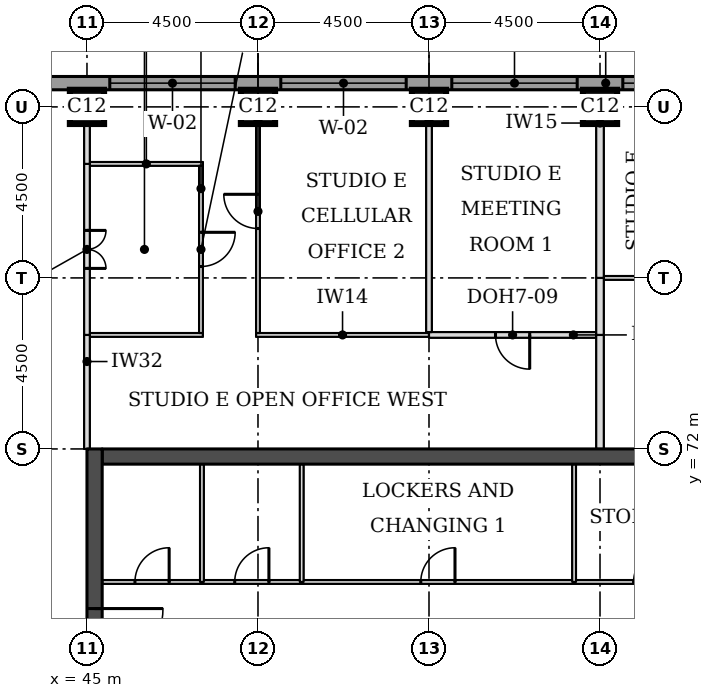
"""IFC4 building model, lengths in metres.
Left out: names, types, materials, properties, quantities, classifications, styles, units other than length and angle.
Written with IfcOpenShell. Run it as: python <this file> out.ifc"""

import sys

from ifc_helpers import new_model, si_unit, direction, frame, frame_2d, origin, origin_2d, place, context, subcontext, project, spatial, rectangle, extrude, element, fill, save


model = new_model("IFC4")
c1 = context("Model", 3, precision=1e-05, world=origin(), true_north=direction((0.0, 1.0)))
c2 = subcontext(c1, "Body", "Model", "MODEL_VIEW")
j1 = project(units=[si_unit("LENGTHUNIT", "METRE"), si_unit("PLANEANGLEUNIT", "RADIAN")], contexts=[c1])
p1 = place(None, origin())
s1 = spatial("IfcSite", under=j1, at=p1, CompositionType="ELEMENT")
p2 = place(p1, origin())
s2 = spatial("IfcBuilding", under=s1, at=p2, CompositionType="ELEMENT")
p3 = place(p2, frame((0.0, 0.0, 192.1)))
s3 = spatial("IfcBuildingStorey", under=s2, at=p3, CompositionType="ELEMENT", Elevation=192.1)
for number, where, z_axis, x_axis in (
    (1, (45.0, 81.0, 0.0), (0.0, 0.0, 1.0), (1.0, 0.0, 0.0)),
    (2, (49.5, 81.0, 0.0), (0.0, 0.0, 1.0), (1.0, 0.0, 0.0)),
    (3, (54.0, 81.0, 0.0), (0.0, 0.0, 1.0), (1.0, 0.0, 0.0)),
    (4, (58.5, 81.0, 0.0), (0.0, 0.0, 1.0), (1.0, 0.0, 0.0)),
):
    element("IfcColumn", number, at=place(p3, frame(where, z_axis=z_axis, x_axis=x_axis)), inside=s3, PredefinedType="COLUMN", context=c2, shape_type="SweptSolid", body=[
        extrude(rectangle(XDim=0.9, YDim=0.9, at=origin_2d()), origin(), (0.0, 0.0, 1.0), 3.7),
    ])
p4 = place(p3, frame((45.4, 71.8, 0.0), z_axis=(0.0, 0.0, 1.0), x_axis=(1.0, 0.0, 0.0)))
e5 = element("IfcWall", 5, at=p4, inside=s3, PredefinedType="SHEAR", context=c2, shape_type="SweptSolid", body=[
    extrude(rectangle(XDim=21.7, YDim=0.4, at=frame_2d((10.85, 0.0))), origin(), (0.0, 0.0, 1.0), 3.7),
])
p5 = place(p3, frame((45.2, 49.5, 0.0), z_axis=(0.0, 0.0, 1.0), x_axis=(0.0, 1.0, 0.0)))
e6 = element("IfcWall", 6, at=p5, inside=s3, PredefinedType="SHEAR", context=c2, shape_type="SweptSolid", body=[
    extrude(rectangle(XDim=22.5, YDim=0.4, at=frame_2d((11.25, 0.0))), origin(), (0.0, 0.0, 1.0), 3.7),
])
p6 = place(p5, frame((4.2, 0.0, 0.0)))
e7 = element("IfcOpeningElement", 7, at=p6, cuts=e6, PredefinedType="OPENING", context=c2, shape_type="SweptSolid", body=[
    extrude(rectangle(XDim=1.8, YDim=2.1, at=frame_2d((0.9, 1.05))), frame((0.0, 0.21, 0.0), z_axis=(0.0, -1.0, 0.0), x_axis=(1.0, 0.0, 0.0)), (0.0, 0.0, 1.0), 0.42),
])
p7 = place(p5, frame((6.9, 0.0, 0.0)))
e8 = element("IfcOpeningElement", 8, at=p7, cuts=e6, PredefinedType="OPENING", context=c2, shape_type="SweptSolid", body=[
    extrude(rectangle(XDim=1.1, YDim=2.1, at=frame_2d((0.55, 1.05))), frame((0.0, 0.21, 0.0), z_axis=(0.0, -1.0, 0.0), x_axis=(1.0, 0.0, 0.0)), (0.0, 0.0, 1.0), 0.42),
])
p8 = place(p5, frame((13.6, 0.0, 0.0)))
e9 = element("IfcOpeningElement", 9, at=p8, cuts=e6, PredefinedType="OPENING", context=c2, shape_type="SweptSolid", body=[
    extrude(rectangle(XDim=1.1, YDim=2.1, at=frame_2d((0.55, 1.05))), frame((0.0, 0.21, 0.0), z_axis=(0.0, -1.0, 0.0), x_axis=(1.0, 0.0, 0.0)), (0.0, 0.0, 1.0), 0.42),
])
p9 = place(p5, frame((16.5, 0.0, 0.0)))
e10 = element("IfcOpeningElement", 10, at=p9, cuts=e6, PredefinedType="OPENING", context=c2, shape_type="SweptSolid", body=[
    extrude(rectangle(XDim=1.8, YDim=2.1, at=frame_2d((0.9, 1.05))), frame((0.0, 0.21, 0.0), z_axis=(0.0, -1.0, 0.0), x_axis=(1.0, 0.0, 0.0)), (0.0, 0.0, 1.0), 0.42),
])
p10 = place(p3, frame((72.331, 81.625, 0.0), z_axis=(0.0, 0.0, 1.0), x_axis=(-1.0, 0.0, 0.0)))
e11 = element("IfcWall", 11, at=p10, inside=s3, PredefinedType="STANDARD", context=c2, shape_type="SweptSolid", body=[
    extrude(rectangle(XDim=32.163, YDim=0.35, at=frame_2d((16.081, 0.0))), origin(), (0.0, 0.0, 1.0), 3.525),
])
p11 = place(p10, frame((5.431, 0.0, 0.9)))
e12 = element("IfcOpeningElement", 12, at=p11, cuts=e11, PredefinedType="OPENING", context=c2, shape_type="SweptSolid", body=[
    extrude(rectangle(XDim=3.3, YDim=1.9, at=frame_2d((1.65, 0.95))), frame((0.0, 0.185, 0.0), z_axis=(0.0, -1.0, 0.0), x_axis=(1.0, 0.0, 0.0)), (0.0, 0.0, 1.0), 0.37),
])
p12 = place(p10, frame((9.931, 0.0, 0.9)))
e13 = element("IfcOpeningElement", 13, at=p12, cuts=e11, PredefinedType="OPENING", context=c2, shape_type="SweptSolid", body=[
    extrude(rectangle(XDim=3.3, YDim=1.9, at=frame_2d((1.65, 0.95))), frame((0.0, 0.185, 0.0), z_axis=(0.0, -1.0, 0.0), x_axis=(1.0, 0.0, 0.0)), (0.0, 0.0, 1.0), 0.37),
])
p13 = place(p10, frame((14.431, 0.0, 0.9)))
e14 = element("IfcOpeningElement", 14, at=p13, cuts=e11, PredefinedType="OPENING", context=c2, shape_type="SweptSolid", body=[
    extrude(rectangle(XDim=3.3, YDim=1.9, at=frame_2d((1.65, 0.95))), frame((0.0, 0.185, 0.0), z_axis=(0.0, -1.0, 0.0), x_axis=(1.0, 0.0, 0.0)), (0.0, 0.0, 1.0), 0.37),
])
p14 = place(p10, frame((18.931, 0.0, 0.9)))
e15 = element("IfcOpeningElement", 15, at=p14, cuts=e11, PredefinedType="OPENING", context=c2, shape_type="SweptSolid", body=[
    extrude(rectangle(XDim=3.3, YDim=1.9, at=frame_2d((1.65, 0.95))), frame((0.0, 0.185, 0.0), z_axis=(0.0, -1.0, 0.0), x_axis=(1.0, 0.0, 0.0)), (0.0, 0.0, 1.0), 0.37),
])
p15 = place(p10, frame((23.431, 0.0, 0.9)))
e16 = element("IfcOpeningElement", 16, at=p15, cuts=e11, PredefinedType="OPENING", context=c2, shape_type="SweptSolid", body=[
    extrude(rectangle(XDim=3.3, YDim=1.9, at=frame_2d((1.65, 0.95))), frame((0.0, 0.185, 0.0), z_axis=(0.0, -1.0, 0.0), x_axis=(1.0, 0.0, 0.0)), (0.0, 0.0, 1.0), 0.37),
])
p16 = place(p3, frame((45.075, 75.0, 0.0), z_axis=(0.0, 0.0, 1.0), x_axis=(1.0, 0.0, 0.0)))
e17 = element("IfcWall", 17, at=p16, inside=s3, PredefinedType="PARTITIONING", context=c2, shape_type="SweptSolid", body=[
    extrude(rectangle(XDim=2.975, YDim=0.1, at=frame_2d((1.488, 0.0))), origin(), (0.0, 0.0, 1.0), 3.55),
])
p17 = place(p3, frame((49.45, 75.0, 0.0), z_axis=(0.0, 0.0, 1.0), x_axis=(1.0, 0.0, 0.0)))
e18 = element("IfcWall", 18, at=p17, inside=s3, PredefinedType="PARTITIONING", context=c2, shape_type="SweptSolid", body=[
    extrude(rectangle(XDim=4.55, YDim=0.1, at=frame_2d((2.275, 0.0))), origin(), (0.0, 0.0, 1.0), 3.55),
])
p18 = place(p3, frame((54.0, 75.0, 0.0), z_axis=(0.0, 0.0, 1.0), x_axis=(1.0, 0.0, 0.0)))
e19 = element("IfcWall", 19, at=p18, inside=s3, PredefinedType="PARTITIONING", context=c2, shape_type="SweptSolid", body=[
    extrude(rectangle(XDim=4.4, YDim=0.15, at=frame_2d((2.2, 0.0))), origin(), (0.0, 0.0, 1.0), 3.55),
])
p19 = place(p18, frame((1.75, 0.0, 0.0)))
e20 = element("IfcOpeningElement", 20, at=p19, cuts=e19, PredefinedType="OPENING", context=c2, shape_type="SweptSolid", body=[
    extrude(rectangle(XDim=0.9, YDim=2.1, at=frame_2d((0.45, 1.05))), frame((0.0, 0.085, 0.0), z_axis=(0.0, -1.0, 0.0), x_axis=(1.0, 0.0, 0.0)), (0.0, 0.0, 1.0), 0.17),
])
p20 = place(p3, frame((58.6, 76.5, 0.0), z_axis=(0.0, 0.0, 1.0), x_axis=(1.0, 0.0, 0.0)))
e21 = element("IfcWall", 21, at=p20, inside=s3, PredefinedType="PARTITIONING", context=c2, shape_type="SweptSolid", body=[
    extrude(rectangle(XDim=4.45, YDim=0.1, at=frame_2d((2.225, 0.0))), origin(), (0.0, 0.0, 1.0), 3.55),
])
p21 = place(p3, frame((45.075, 79.5, 0.0), z_axis=(0.0, 0.0, 1.0), x_axis=(1.0, 0.0, 0.0)))
e22 = element("IfcWall", 22, at=p21, inside=s3, PredefinedType="PARTITIONING", context=c2, shape_type="SweptSolid", body=[
    extrude(rectangle(XDim=2.975, YDim=0.1, at=frame_2d((1.488, 0.0))), origin(), (0.0, 0.0, 1.0), 3.55),
])
p22 = place(p3, frame((45.0, 72.0, 0.0), z_axis=(0.0, 0.0, 1.0), x_axis=(0.0, 1.0, 0.0)))
e23 = element("IfcWall", 23, at=p22, inside=s3, PredefinedType="PARTITIONING", context=c2, shape_type="SweptSolid", body=[
    extrude(rectangle(XDim=3.0, YDim=0.15, at=frame_2d((1.5, 0.0))), origin(), (0.0, 0.0, 1.0), 3.022),
])
p23 = place(p3, frame((58.5, 72.0, 0.0), z_axis=(0.0, 0.0, 1.0), x_axis=(0.0, 1.0, 0.0)))
e24 = element("IfcWall", 24, at=p23, inside=s3, PredefinedType="PARTITIONING", context=c2, shape_type="SweptSolid", body=[
    extrude(rectangle(XDim=3.0, YDim=0.2, at=frame_2d((1.5, 0.0))), origin(), (0.0, 0.0, 1.0), 3.55),
])
p24 = place(p3, frame((45.0, 75.0, 0.0), z_axis=(0.0, 0.0, 1.0), x_axis=(0.0, 1.0, 0.0)))
e25 = element("IfcWall", 25, at=p24, inside=s3, PredefinedType="PARTITIONING", context=c2, shape_type="SweptSolid", body=[
    extrude(rectangle(XDim=4.5, YDim=0.15, at=frame_2d((2.25, 0.0))), origin(), (0.0, 0.0, 1.0), 3.022),
])
p25 = place(p24, frame((1.75, 0.0, 0.0)))
e26 = element("IfcOpeningElement", 26, at=p25, cuts=e25, PredefinedType="OPENING", context=c2, shape_type="SweptSolid", body=[
    extrude(rectangle(XDim=1.0, YDim=2.1, at=frame_2d((0.5, 1.05))), frame((0.0, 0.085, 0.0), z_axis=(0.0, -1.0, 0.0), x_axis=(1.0, 0.0, 0.0)), (0.0, 0.0, 1.0), 0.17),
])
p26 = place(p3, frame((58.5, 75.0, 0.0), z_axis=(0.0, 0.0, 1.0), x_axis=(0.0, 1.0, 0.0)))
e27 = element("IfcWall", 27, at=p26, inside=s3, PredefinedType="PARTITIONING", context=c2, shape_type="SweptSolid", body=[
    extrude(rectangle(XDim=1.5, YDim=0.2, at=frame_2d((0.75, 0.0))), origin(), (0.0, 0.0, 1.0), 3.55),
])
p27 = place(p3, frame((48.0, 75.05, 0.0), z_axis=(0.0, 0.0, 1.0), x_axis=(0.0, 1.0, 0.0)))
e28 = element("IfcWall", 28, at=p27, inside=s3, PredefinedType="PARTITIONING", context=c2, shape_type="SweptSolid", body=[
    extrude(rectangle(XDim=4.4, YDim=0.1, at=frame_2d((2.2, 0.0))), origin(), (0.0, 0.0, 1.0), 3.55),
])
p28 = place(p27, frame((1.75, 0.0, 0.0)))
e29 = element("IfcOpeningElement", 29, at=p28, cuts=e28, PredefinedType="OPENING", context=c2, shape_type="SweptSolid", body=[
    extrude(rectangle(XDim=0.9, YDim=2.1, at=frame_2d((0.45, 1.05))), frame((0.0, 0.06, 0.0), z_axis=(0.0, -1.0, 0.0), x_axis=(1.0, 0.0, 0.0)), (0.0, 0.0, 1.0), 0.12),
])
p29 = place(p3, frame((49.5, 75.05, 0.0), z_axis=(0.0, 0.0, 1.0), x_axis=(0.0, 1.0, 0.0)))
e30 = element("IfcWall", 30, at=p29, inside=s3, PredefinedType="PARTITIONING", context=c2, shape_type="SweptSolid", body=[
    extrude(rectangle(XDim=6.4, YDim=0.1, at=frame_2d((3.2, 0.0))), origin(), (0.0, 0.0, 1.0), 3.55),
])
p30 = place(p29, frame((2.75, 0.0, 0.0)))
e31 = element("IfcOpeningElement", 31, at=p30, cuts=e30, PredefinedType="OPENING", context=c2, shape_type="SweptSolid", body=[
    extrude(rectangle(XDim=0.9, YDim=2.1, at=frame_2d((0.45, 1.05))), frame((0.0, 0.06, 0.0), z_axis=(0.0, -1.0, 0.0), x_axis=(1.0, 0.0, 0.0)), (0.0, 0.0, 1.0), 0.12),
])
p31 = place(p3, frame((54.0, 75.075, 0.0), z_axis=(0.0, 0.0, 1.0), x_axis=(0.0, 1.0, 0.0)))
e32 = element("IfcWall", 32, at=p31, inside=s3, PredefinedType="PARTITIONING", context=c2, shape_type="SweptSolid", body=[
    extrude(rectangle(XDim=6.375, YDim=0.15, at=frame_2d((3.188, 0.0))), origin(), (0.0, 0.0, 1.0), 3.55),
])
p32 = place(p3, frame((58.5, 76.5, 0.0), z_axis=(0.0, 0.0, 1.0), x_axis=(0.0, 1.0, 0.0)))
e33 = element("IfcWall", 33, at=p32, inside=s3, PredefinedType="PARTITIONING", context=c2, shape_type="SweptSolid", body=[
    extrude(rectangle(XDim=4.95, YDim=0.2, at=frame_2d((2.475, 0.0))), origin(), (0.0, 0.0, 1.0), 3.55),
])
p33 = place(p3, frame((45.0, 79.5, 0.0), z_axis=(0.0, 0.0, 1.0), x_axis=(0.0, 1.0, 0.0)))
e34 = element("IfcWall", 34, at=p33, inside=s3, PredefinedType="PARTITIONING", context=c2, shape_type="SweptSolid", body=[
    extrude(rectangle(XDim=1.95, YDim=0.15, at=frame_2d((0.975, 0.0))), origin(), (0.0, 0.0, 1.0), 3.022),
])
p34 = place(p3, frame((45.4, 68.5, 0.0), z_axis=(0.0, 0.0, 1.0), x_axis=(1.0, 0.0, 0.0)))
e35 = element("IfcWall", 35, at=p34, inside=s3, PredefinedType="PARTITIONING", context=c2, shape_type="SweptSolid", body=[
    extrude(rectangle(XDim=21.7, YDim=0.1, at=frame_2d((10.85, 0.0))), origin(), (0.0, 0.0, 1.0), 3.55),
])
p35 = place(p34, frame((18.625, 0.0, 0.0)))
e36 = element("IfcOpeningElement", 36, at=p35, cuts=e35, PredefinedType="OPENING", context=c2, shape_type="SweptSolid", body=[
    extrude(rectangle(XDim=0.9, YDim=2.1, at=frame_2d((0.45, 1.05))), frame((0.0, 0.06, 0.0), z_axis=(0.0, -1.0, 0.0), x_axis=(1.0, 0.0, 0.0)), (0.0, 0.0, 1.0), 0.12),
])
p36 = place(p34, frame((0.863, 0.0, 0.0)))
e37 = element("IfcOpeningElement", 37, at=p36, cuts=e35, PredefinedType="OPENING", context=c2, shape_type="SweptSolid", body=[
    extrude(rectangle(XDim=0.9, YDim=2.1, at=frame_2d((0.45, 1.05))), frame((0.0, 0.06, 0.0), z_axis=(0.0, -1.0, 0.0), x_axis=(1.0, 0.0, 0.0)), (0.0, 0.0, 1.0), 0.12),
])
p37 = place(p34, frame((3.488, 0.0, 0.0)))
e38 = element("IfcOpeningElement", 38, at=p37, cuts=e35, PredefinedType="OPENING", context=c2, shape_type="SweptSolid", body=[
    extrude(rectangle(XDim=0.9, YDim=2.1, at=frame_2d((0.45, 1.05))), frame((0.0, 0.06, 0.0), z_axis=(0.0, -1.0, 0.0), x_axis=(1.0, 0.0, 0.0)), (0.0, 0.0, 1.0), 0.12),
])
p38 = place(p34, frame((13.984, 0.0, 0.0)))
e39 = element("IfcOpeningElement", 39, at=p38, cuts=e35, PredefinedType="OPENING", context=c2, shape_type="SweptSolid", body=[
    extrude(rectangle(XDim=0.9, YDim=2.1, at=frame_2d((0.45, 1.05))), frame((0.0, 0.06, 0.0), z_axis=(0.0, -1.0, 0.0), x_axis=(1.0, 0.0, 0.0)), (0.0, 0.0, 1.0), 0.12),
])
p39 = place(p34, frame((8.384, 0.0, 0.0)))
e40 = element("IfcOpeningElement", 40, at=p39, cuts=e35, PredefinedType="OPENING", context=c2, shape_type="SweptSolid", body=[
    extrude(rectangle(XDim=0.9, YDim=2.1, at=frame_2d((0.45, 1.05))), frame((0.0, 0.06, 0.0), z_axis=(0.0, -1.0, 0.0), x_axis=(1.0, 0.0, 0.0)), (0.0, 0.0, 1.0), 0.12),
])
for number, where, z_axis, x_axis in (
    (41, (48.025, 68.5, 0.0), (0.0, 0.0, 1.0), (0.0, 1.0, 0.0)),
    (42, (50.65, 68.5, 0.0), (0.0, 0.0, 1.0), (0.0, 1.0, 0.0)),
    (43, (57.818, 68.5, 0.0), (0.0, 0.0, 1.0), (0.0, 1.0, 0.0)),
):
    element("IfcWall", number, at=place(p3, frame(where, z_axis=z_axis, x_axis=x_axis)), inside=s3, PredefinedType="PARTITIONING", context=c2, shape_type="SweptSolid", body=[
        extrude(rectangle(XDim=3.1, YDim=0.1, at=frame_2d((1.55, 0.0))), origin(), (0.0, 0.0, 1.0), 3.55),
    ])
p40 = place(p12, origin())
e44 = element("IfcWindow", 44, at=p40, inside=s3, PartitioningType="SINGLE_PANEL", PredefinedType="WINDOW", context=c2, shape_type="SweptSolid", body=[
    extrude(rectangle(XDim=3.3, YDim=1.9, at=frame_2d((1.65, 0.95))), frame((0.0, 0.085, 0.0), z_axis=(0.0, -1.0, 0.0), x_axis=(1.0, 0.0, 0.0)), (0.0, 0.0, 1.0), 0.06),
])
fill(e13, e44)
p41 = place(p13, origin())
e45 = element("IfcWindow", 45, at=p41, inside=s3, PartitioningType="SINGLE_PANEL", PredefinedType="WINDOW", context=c2, shape_type="SweptSolid", body=[
    extrude(rectangle(XDim=3.3, YDim=1.9, at=frame_2d((1.65, 0.95))), frame((0.0, 0.085, 0.0), z_axis=(0.0, -1.0, 0.0), x_axis=(1.0, 0.0, 0.0)), (0.0, 0.0, 1.0), 0.06),
])
fill(e14, e45)
p42 = place(p14, origin())
e46 = element("IfcWindow", 46, at=p42, inside=s3, PartitioningType="SINGLE_PANEL", PredefinedType="WINDOW", context=c2, shape_type="SweptSolid", body=[
    extrude(rectangle(XDim=3.3, YDim=1.9, at=frame_2d((1.65, 0.95))), frame((0.0, 0.085, 0.0), z_axis=(0.0, -1.0, 0.0), x_axis=(1.0, 0.0, 0.0)), (0.0, 0.0, 1.0), 0.06),
])
fill(e15, e46)
p43 = place(p15, origin())
e47 = element("IfcWindow", 47, at=p43, inside=s3, PartitioningType="SINGLE_PANEL", PredefinedType="WINDOW", context=c2, shape_type="SweptSolid", body=[
    extrude(rectangle(XDim=3.3, YDim=1.9, at=frame_2d((1.65, 0.95))), frame((0.0, 0.085, 0.0), z_axis=(0.0, -1.0, 0.0), x_axis=(1.0, 0.0, 0.0)), (0.0, 0.0, 1.0), 0.06),
])
fill(e16, e47)
p44 = place(p25, frame((1.0, 0.0, 0.0), z_axis=(0.0, 0.0, 1.0), x_axis=(-1.0, 0.0, 0.0)))
e48 = element("IfcDoor", 48, at=p44, inside=s3, OperationType="DOUBLE_DOOR_SINGLE_SWING", PredefinedType="DOOR", context=c2, shape_type="SweptSolid", body=[
    extrude(rectangle(XDim=1.0, YDim=2.1, at=frame_2d((0.5, 1.05))), frame((0.0, 0.025, 0.0), z_axis=(0.0, -1.0, 0.0), x_axis=(1.0, 0.0, 0.0)), (0.0, 0.0, 1.0), 0.05),
])
fill(e26, e48)
p45 = place(p28, frame((0.9, 0.0, 0.0), z_axis=(0.0, 0.0, 1.0), x_axis=(-1.0, 0.0, 0.0)))
e49 = element("IfcDoor", 49, at=p45, inside=s3, OperationType="SINGLE_SWING_LEFT", PredefinedType="DOOR", context=c2, shape_type="SweptSolid", body=[
    extrude(rectangle(XDim=0.9, YDim=2.1, at=frame_2d((0.45, 1.05))), frame((0.0, 0.025, 0.0), z_axis=(0.0, -1.0, 0.0), x_axis=(1.0, 0.0, 0.0)), (0.0, 0.0, 1.0), 0.05),
])
fill(e29, e49)
p46 = place(p30, origin())
e50 = element("IfcDoor", 50, at=p46, inside=s3, OperationType="SINGLE_SWING_RIGHT", PredefinedType="DOOR", context=c2, shape_type="SweptSolid", body=[
    extrude(rectangle(XDim=0.9, YDim=2.1, at=frame_2d((0.45, 1.05))), frame((0.0, 0.025, 0.0), z_axis=(0.0, -1.0, 0.0), x_axis=(1.0, 0.0, 0.0)), (0.0, 0.0, 1.0), 0.05),
])
fill(e31, e50)
p47 = place(p19, frame((0.9, 0.0, 0.0), z_axis=(0.0, 0.0, 1.0), x_axis=(-1.0, 0.0, 0.0)))
e51 = element("IfcDoor", 51, at=p47, inside=s3, OperationType="SINGLE_SWING_LEFT", PredefinedType="DOOR", context=c2, shape_type="SweptSolid", body=[
    extrude(rectangle(XDim=0.9, YDim=2.1, at=frame_2d((0.45, 1.05))), frame((0.0, 0.025, 0.0), z_axis=(0.0, -1.0, 0.0), x_axis=(1.0, 0.0, 0.0)), (0.0, 0.0, 1.0), 0.05),
])
fill(e20, e51)
p48 = place(p9, frame((1.8, 0.0, 0.0), z_axis=(0.0, 0.0, 1.0), x_axis=(-1.0, 0.0, 0.0)))
e52 = element("IfcDoor", 52, at=p48, inside=s3, OperationType="SINGLE_SWING_LEFT", PredefinedType="DOOR", context=c2, shape_type="SweptSolid", body=[
    extrude(rectangle(XDim=1.8, YDim=2.1, at=frame_2d((0.9, 1.05))), frame((0.0, 0.025, 0.0), z_axis=(0.0, -1.0, 0.0), x_axis=(1.0, 0.0, 0.0)), (0.0, 0.0, 1.0), 0.05),
])
fill(e10, e52)
p49 = place(p36, origin())
e53 = element("IfcDoor", 53, at=p49, inside=s3, OperationType="SINGLE_SWING_RIGHT", PredefinedType="DOOR", context=c2, shape_type="SweptSolid", body=[
    extrude(rectangle(XDim=0.9, YDim=2.1, at=frame_2d((0.45, 1.05))), frame((0.0, 0.025, 0.0), z_axis=(0.0, -1.0, 0.0), x_axis=(1.0, 0.0, 0.0)), (0.0, 0.0, 1.0), 0.05),
])
fill(e37, e53)
p50 = place(p37, origin())
e54 = element("IfcDoor", 54, at=p50, inside=s3, OperationType="SINGLE_SWING_RIGHT", PredefinedType="DOOR", context=c2, shape_type="SweptSolid", body=[
    extrude(rectangle(XDim=0.9, YDim=2.1, at=frame_2d((0.45, 1.05))), frame((0.0, 0.025, 0.0), z_axis=(0.0, -1.0, 0.0), x_axis=(1.0, 0.0, 0.0)), (0.0, 0.0, 1.0), 0.05),
])
fill(e38, e54)
p51 = place(p38, origin())
e55 = element("IfcDoor", 55, at=p51, inside=s3, OperationType="SINGLE_SWING_RIGHT", PredefinedType="DOOR", context=c2, shape_type="SweptSolid", body=[
    extrude(rectangle(XDim=0.9, YDim=2.1, at=frame_2d((0.45, 1.05))), frame((0.0, 0.025, 0.0), z_axis=(0.0, -1.0, 0.0), x_axis=(1.0, 0.0, 0.0)), (0.0, 0.0, 1.0), 0.05),
])
fill(e39, e55)
p52 = place(p39, origin())
e56 = element("IfcDoor", 56, at=p52, inside=s3, OperationType="SINGLE_SWING_RIGHT", PredefinedType="DOOR", context=c2, shape_type="SweptSolid", body=[
    extrude(rectangle(XDim=0.9, YDim=2.1, at=frame_2d((0.45, 1.05))), frame((0.0, 0.025, 0.0), z_axis=(0.0, -1.0, 0.0), x_axis=(1.0, 0.0, 0.0)), (0.0, 0.0, 1.0), 0.05),
])
fill(e40, e56)
save(model, sys.argv[1])
